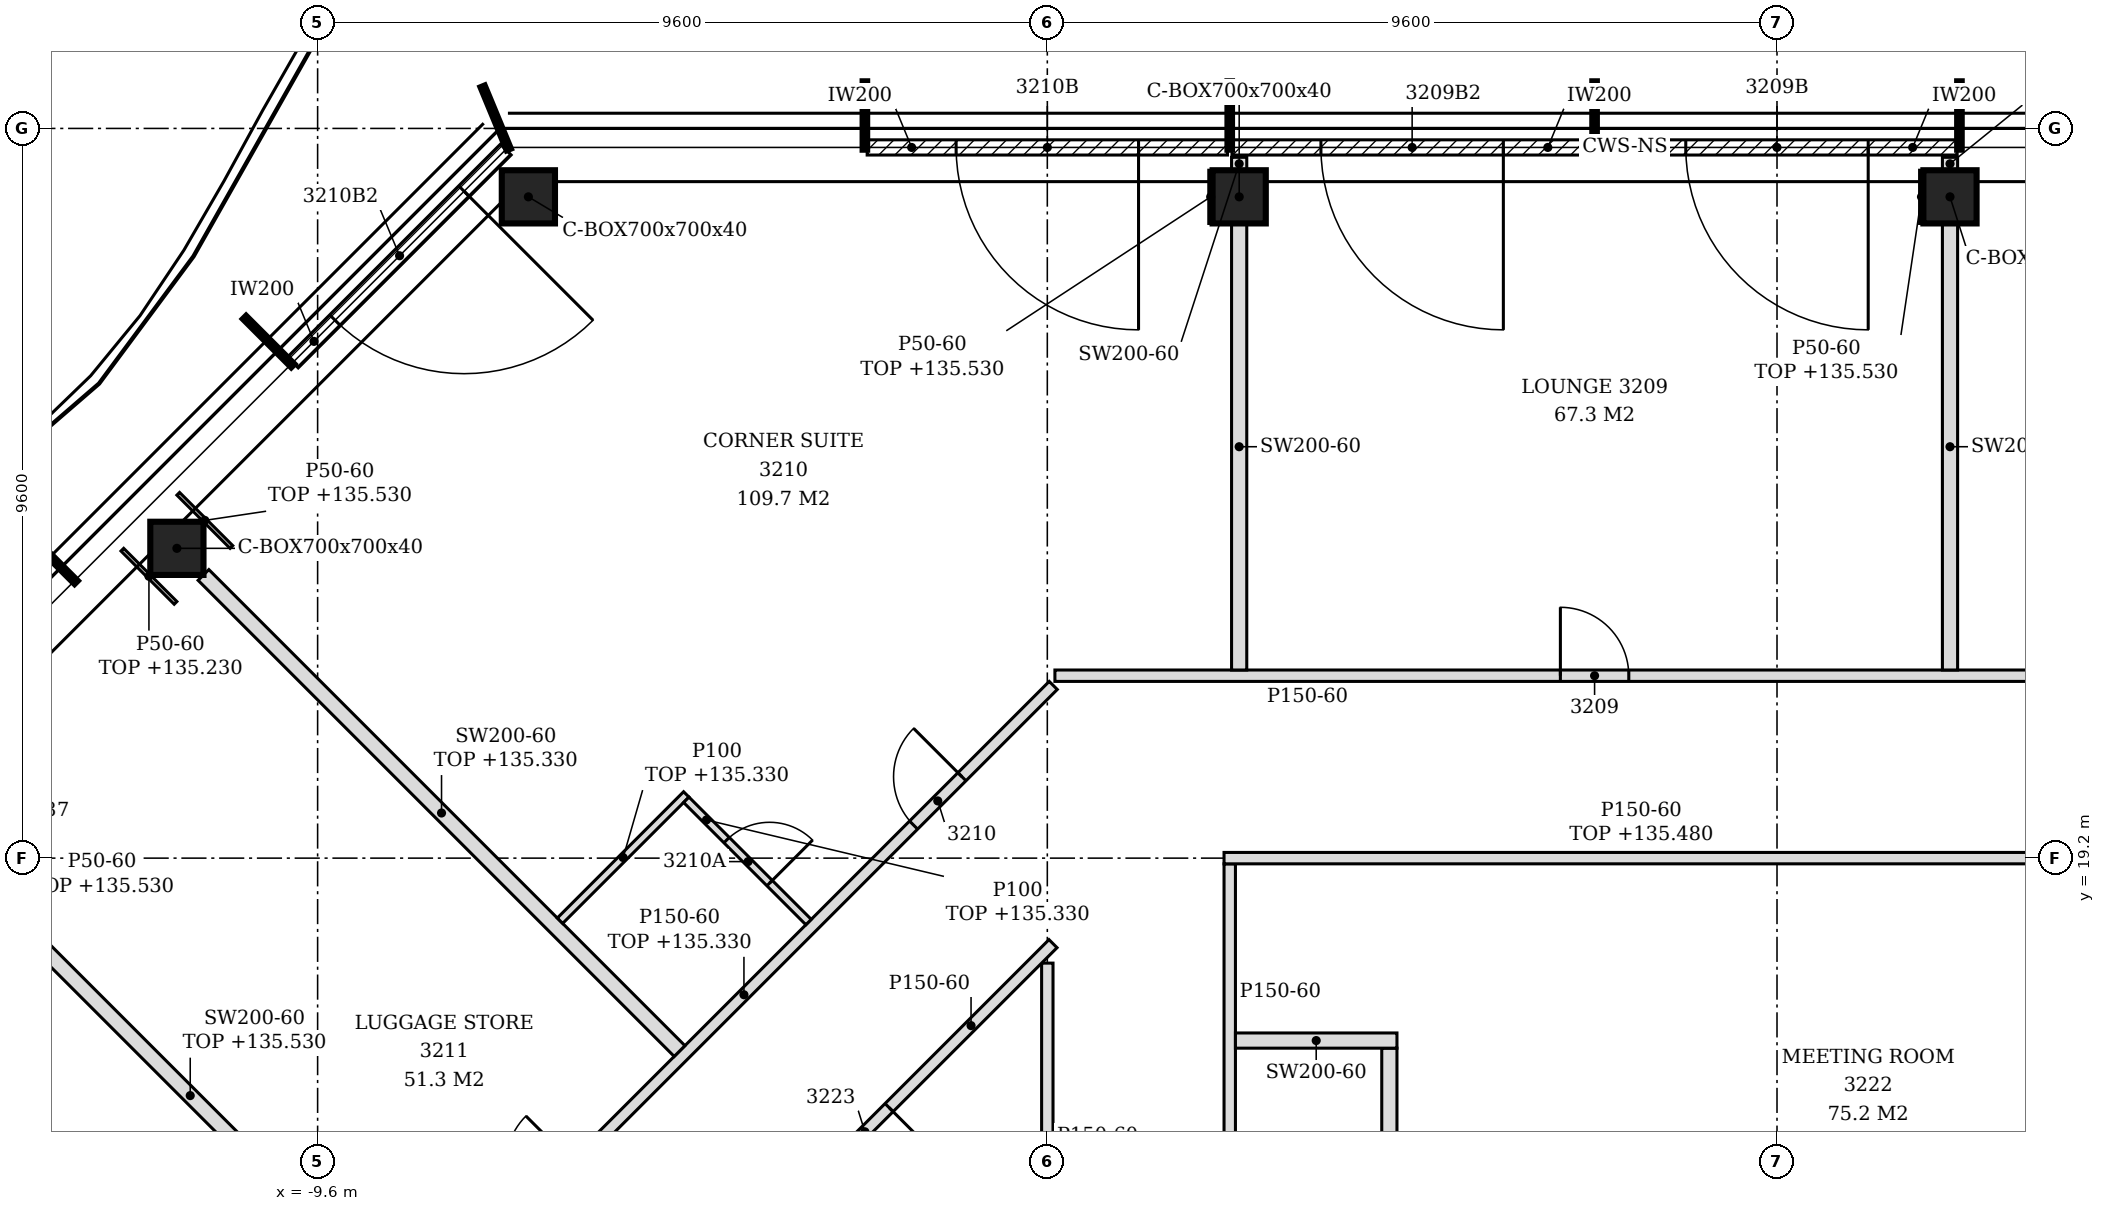
"""IFC4 building model, lengths in metres.
Left out: names, types, materials, properties, quantities, classifications, styles, units other than length and angle.
Written with IfcOpenShell. Run it as: python <this file> out.ifc"""

import sys

from ifc_helpers import new_model, si_unit, direction, frame, frame_2d, origin, origin_2d, place, context, subcontext, project, spatial, polyline, rectangle, hollow_rectangle, outline, extrude, element, fill, save


model = new_model("IFC4")
c1 = context("Model", 3, precision=1e-05, world=origin(), true_north=direction((0.0, 1.0)))
c2 = subcontext(c1, "Body", "Model", "MODEL_VIEW")
j1 = project(units=[si_unit("LENGTHUNIT", "METRE"), si_unit("PLANEANGLEUNIT", "RADIAN")], contexts=[c1])
p1 = place(None, origin())
s1 = spatial("IfcSite", under=j1, at=p1, CompositionType="ELEMENT")
p2 = place(p1, origin())
s2 = spatial("IfcBuilding", under=s1, at=p2, CompositionType="ELEMENT")
p3 = place(p2, frame((0.0, 0.0, 132.6)))
s3 = spatial("IfcBuildingStorey", under=s2, at=p3, CompositionType="ELEMENT", Elevation=132.6)
for number, where, z_axis, x_axis in (
    (1, (11.876, 27.9, -0.15), (0.0, 0.0, 1.0), (1.0, 0.0, 0.0)),
    (2, (2.524, 27.9, -0.15), (0.0, 0.0, 1.0), (1.0, 0.0, 0.0)),
    (3, (-6.827, 27.9, -0.15), (0.0, 0.0, 1.0), (1.0, 0.0, 0.0)),
    (4, (-11.451, 23.276, -0.15), (0.0, 0.0, 1.0), (1.0, 0.0, 0.0)),
):
    element("IfcColumn", number, at=place(p3, frame(where, z_axis=z_axis, x_axis=x_axis)), inside=s3, PredefinedType="COLUMN", context=c2, shape_type="SweptSolid", body=[
        extrude(hollow_rectangle(XDim=0.7, YDim=0.7, WallThickness=0.04, at=origin_2d()), origin(), (0.0, 0.0, 1.0), 3.6),
    ])
p4 = place(p3, frame((11.97, 28.55, 0.0), z_axis=(0.0, 0.0, 1.0), x_axis=(-1.0, 0.0, 0.0)))
e5 = element("IfcWall", 5, at=p4, inside=s3, PredefinedType="NOTDEFINED", context=c2, shape_type="SweptSolid", body=[
    extrude(rectangle(XDim=4.74, YDim=0.2, at=frame_2d((2.37, 0.0))), origin(), (0.0, 0.0, 1.0), 3.45),
])
p5 = place(p4, frame((1.17, 0.0, 0.0)))
e6 = element("IfcOpeningElement", 6, at=p5, cuts=e5, PredefinedType="OPENING", context=c2, shape_type="SweptSolid", body=[
    extrude(rectangle(XDim=2.4, YDim=2.4, at=frame_2d((1.2, 1.2))), frame((0.0, 0.11, 0.0), z_axis=(0.0, -1.0, 0.0), x_axis=(1.0, 0.0, 0.0)), (0.0, 0.0, 1.0), 0.22),
])
p6 = place(p3, frame((7.17, 28.55, 0.0), z_axis=(0.0, 0.0, 1.0), x_axis=(-1.0, 0.0, 0.0)))
e7 = element("IfcWall", 7, at=p6, inside=s3, PredefinedType="NOTDEFINED", context=c2, shape_type="SweptSolid", body=[
    extrude(rectangle(XDim=4.74, YDim=0.2, at=frame_2d((2.37, 0.0))), origin(), (0.0, 0.0, 1.0), 3.45),
])
p7 = place(p6, frame((1.17, 0.0, 0.0)))
e8 = element("IfcOpeningElement", 8, at=p7, cuts=e7, PredefinedType="OPENING", context=c2, shape_type="SweptSolid", body=[
    extrude(rectangle(XDim=2.4, YDim=2.4, at=frame_2d((1.2, 1.2))), frame((0.0, 0.11, 0.0), z_axis=(0.0, -1.0, 0.0), x_axis=(1.0, 0.0, 0.0)), (0.0, 0.0, 1.0), 0.22),
])
p8 = place(p3, frame((2.37, 28.55, 0.0), z_axis=(0.0, 0.0, 1.0), x_axis=(-1.0, 0.0, 0.0)))
e9 = element("IfcWall", 9, at=p8, inside=s3, PredefinedType="NOTDEFINED", context=c2, shape_type="SweptSolid", body=[
    extrude(rectangle(XDim=4.74, YDim=0.2, at=frame_2d((2.37, 0.0))), origin(), (0.0, 0.0, 1.0), 3.45),
])
p9 = place(p8, frame((1.17, 0.0, 0.0)))
e10 = element("IfcOpeningElement", 10, at=p9, cuts=e9, PredefinedType="OPENING", context=c2, shape_type="SweptSolid", body=[
    extrude(rectangle(XDim=2.4, YDim=2.4, at=frame_2d((1.2, 1.2))), frame((0.0, 0.11, 0.0), z_axis=(0.0, -1.0, 0.0), x_axis=(1.0, 0.0, 0.0)), (0.0, 0.0, 1.0), 0.22),
])
p10 = place(p3, frame((-7.125, 28.522, 0.0), z_axis=(0.0, 0.0, 1.0), x_axis=(-0.707106781187, -0.707106781187, 0.0)))
e11 = element("IfcWall", 11, at=p10, inside=s3, PredefinedType="NOTDEFINED", context=c2, shape_type="SweptSolid", body=[
    extrude(rectangle(XDim=3.962, YDim=0.2, at=frame_2d((1.981, 0.0))), origin(), (0.0, 0.0, 1.0), 3.45),
])
p11 = place(p10, frame((0.775, 0.0, 0.0)))
e12 = element("IfcOpeningElement", 12, at=p11, cuts=e11, PredefinedType="OPENING", context=c2, shape_type="SweptSolid", body=[
    extrude(rectangle(XDim=2.4, YDim=2.4, at=frame_2d((1.2, 1.2))), frame((0.0, 0.11, 0.0), z_axis=(0.0, -1.0, 0.0), x_axis=(1.0, 0.0, 0.0)), (0.0, 0.0, 1.0), 0.22),
])
p12 = place(p3, frame((-14.475, 6.919, 0.0), z_axis=(0.0, 0.0, 1.0), x_axis=(0.707106781187, 0.707106781187, 0.0)))
e13 = element("IfcWall", 13, at=p12, inside=s3, PredefinedType="PARTITIONING", context=c2, shape_type="SweptSolid", body=[
    extrude(rectangle(XDim=20.581, YDim=0.15, at=frame_2d((10.291, 0.0))), origin(), (0.0, 0.0, 1.0), 2.73),
])
p13 = place(p12, frame((17.983, 0.0, 0.0)))
e14 = element("IfcOpeningElement", 14, at=p13, cuts=e13, PredefinedType="OPENING", context=c2, shape_type="SweptSolid", body=[
    extrude(rectangle(XDim=0.9, YDim=2.1, at=frame_2d((0.45, 1.05))), frame((0.0, 0.085, 0.0), z_axis=(0.0, -1.0, 0.0), x_axis=(1.0, 0.0, 0.0)), (0.0, 0.0, 1.0), 0.17),
])
p14 = place(p12, frame((10.77, 0.0, 0.0)))
e15 = element("IfcOpeningElement", 15, at=p14, cuts=e13, PredefinedType="OPENING", context=c2, shape_type="SweptSolid", body=[
    extrude(rectangle(XDim=0.9, YDim=2.1, at=frame_2d((0.45, 1.05))), frame((0.0, 0.085, 0.0), z_axis=(0.0, -1.0, 0.0), x_axis=(1.0, 0.0, 0.0)), (0.0, 0.0, 1.0), 0.17),
])
p15 = place(p12, frame((7.014, 0.0, 0.0)))
e16 = element("IfcOpeningElement", 16, at=p15, cuts=e13, PredefinedType="OPENING", context=c2, shape_type="SweptSolid", body=[
    extrude(rectangle(XDim=0.9, YDim=2.1, at=frame_2d((0.45, 1.05))), frame((0.0, 0.085, 0.0), z_axis=(0.0, -1.0, 0.0), x_axis=(1.0, 0.0, 0.0)), (0.0, 0.0, 1.0), 0.17),
])
p16 = place(p12, frame((1.499, 0.0, 0.0)))
e17 = element("IfcOpeningElement", 17, at=p16, cuts=e13, PredefinedType="OPENING", context=c2, shape_type="SweptSolid", body=[
    extrude(rectangle(XDim=0.9, YDim=2.1, at=frame_2d((0.45, 1.05))), frame((0.0, 0.085, 0.0), z_axis=(0.0, -1.0, 0.0), x_axis=(1.0, 0.0, 0.0)), (0.0, 0.0, 1.0), 0.17),
])
p17 = place(p3, frame((-8.35, 13.15, 0.0), z_axis=(0.0, 0.0, 1.0), x_axis=(-0.707092030896, 0.707121531169, 0.0)))
e18 = element("IfcWall", 18, at=p17, inside=s3, PredefinedType="PARTITIONING", context=c2, shape_type="SweptSolid", body=[
    extrude(rectangle(XDim=8.276, YDim=0.2, at=frame_2d((4.138, 0.0))), origin(), (0.0, 0.0, 1.0), 2.93),
])
p18 = place(p3, frame((0.0, 13.275, 0.0), z_axis=(0.0, 0.0, 1.0), x_axis=(0.0, 1.0, 0.0)))
e19 = element("IfcWall", 19, at=p18, inside=s3, PredefinedType="PARTITIONING", context=c2, shape_type="SweptSolid", body=[
    extrude(outline(polyline([(0.0, 0.0), (4.544, 0.0), (4.544, 3.45), (0.075, 3.45), (0.073, 2.83), (0.0, 2.83), (0.0, 0.0)])), frame((0.0, 0.075, 0.0), z_axis=(0.0, -1.0, 0.0), x_axis=(1.0, 0.0, 0.0)), (0.0, 0.0, 1.0), 0.15),
])
p19 = place(p3, frame((2.4, 13.275, 0.0), z_axis=(0.0, 0.0, 1.0), x_axis=(0.0, 1.0, 0.0)))
e20 = element("IfcWall", 20, at=p19, inside=s3, PredefinedType="PARTITIONING", context=c2, shape_type="SweptSolid", body=[
    extrude(outline(polyline([(0.0, 0.0), (5.85, 0.0), (5.85, 2.88), (5.82, 2.88), (5.818, 3.45), (0.075, 3.45), (0.073, 2.83), (0.0, 2.83), (0.0, 0.0)])), frame((0.0, 0.075, 0.0), z_axis=(0.0, -1.0, 0.0), x_axis=(1.0, 0.0, 0.0)), (0.0, 0.0, 1.0), 0.15),
])
p20 = place(p19, frame((1.325, 0.0, 0.0)))
e21 = element("IfcOpeningElement", 21, at=p20, cuts=e20, PredefinedType="OPENING", context=c2, shape_type="SweptSolid", body=[
    extrude(rectangle(XDim=0.8, YDim=2.1, at=frame_2d((0.4, 1.05))), frame((0.0, 0.085, 0.0), z_axis=(0.0, -1.0, 0.0), x_axis=(1.0, 0.0, 0.0)), (0.0, 0.0, 1.0), 0.17),
])
p21 = place(p3, frame((4.5, 13.275, 0.0), z_axis=(0.0, 0.0, 1.0), x_axis=(0.0, 1.0, 0.0)))
e22 = element("IfcWall", 22, at=p21, inside=s3, PredefinedType="PARTITIONING", context=c2, shape_type="SweptSolid", body=[
    extrude(outline(polyline([(0.0, 0.0), (3.425, 0.0), (3.425, 3.45), (0.075, 3.45), (0.073, 2.83), (0.0, 2.83), (0.0, 0.0)])), frame((0.0, 0.1, 0.0), z_axis=(0.0, -1.0, 0.0), x_axis=(1.0, 0.0, 0.0)), (0.0, 0.0, 1.0), 0.2),
])
p22 = place(p3, frame((-4.592, 13.408, 0.0), z_axis=(0.0, 0.0, 1.0), x_axis=(0.707106781187, 0.707106781187, 0.0)))
e23 = element("IfcWall", 23, at=p22, inside=s3, PredefinedType="PARTITIONING", context=c2, shape_type="SweptSolid", body=[
    extrude(rectangle(XDim=6.599, YDim=0.15, at=frame_2d((3.3, 0.0))), origin(), (0.0, 0.0, 1.0), 3.45),
])
p23 = place(p22, frame((2.649, 0.0, 0.0)))
e24 = element("IfcOpeningElement", 24, at=p23, cuts=e23, PredefinedType="OPENING", context=c2, shape_type="SweptSolid", body=[
    extrude(rectangle(XDim=0.9, YDim=2.1, at=frame_2d((0.45, 1.05))), frame((0.0, 0.085, 0.0), z_axis=(0.0, -1.0, 0.0), x_axis=(1.0, 0.0, 0.0)), (0.0, 0.0, 1.0), 0.17),
])
p24 = place(p3, frame((-4.838, 16.662, 0.0), z_axis=(0.0, 0.0, 1.0), x_axis=(-0.707120561855, 0.707093000249, 0.0)))
e25 = element("IfcWall", 25, at=p24, inside=s3, PredefinedType="PARTITIONING", context=c2, shape_type="SweptSolid", body=[
    extrude(rectangle(XDim=8.858, YDim=0.2, at=frame_2d((4.429, 0.0))), origin(), (0.0, 0.0, 1.0), 2.73),
])
p25 = place(p3, frame((2.475, 16.8, 0.0), z_axis=(0.0, 0.0, 1.0), x_axis=(1.0, 0.0, 0.0)))
e26 = element("IfcWall", 26, at=p25, inside=s3, PredefinedType="PARTITIONING", context=c2, shape_type="SweptSolid", body=[
    extrude(rectangle(XDim=2.125, YDim=0.2, at=frame_2d((1.062, 0.0))), origin(), (0.0, 0.0, 1.0), 3.45),
])
p26 = place(p3, frame((-6.411, 18.377, 0.0), z_axis=(0.0, 0.0, 1.0), x_axis=(0.707106781187, 0.707106781187, 0.0)))
e27 = element("IfcWall", 27, at=p26, inside=s3, PredefinedType="PARTITIONING", context=c2, shape_type="SweptSolid", body=[
    extrude(rectangle(XDim=2.35, YDim=0.1, at=frame_2d((1.175, 0.0))), origin(), (0.0, 0.0, 1.0), 2.73),
])
p27 = place(p3, frame((-3.141, 18.359, 0.0), z_axis=(0.0, 0.0, 1.0), x_axis=(-0.707053116953, 0.707160441348, 0.0)))
e28 = element("IfcWall", 28, at=p27, inside=s3, PredefinedType="PARTITIONING", context=c2, shape_type="SweptSolid", body=[
    extrude(rectangle(XDim=2.275, YDim=0.1, at=frame_2d((1.137, 0.0))), origin(), (0.0, 0.0, 1.0), 2.73),
])
p28 = place(p27, frame((0.725, 0.0, 0.0)))
e29 = element("IfcOpeningElement", 29, at=p28, cuts=e28, PredefinedType="OPENING", context=c2, shape_type="SweptSolid", body=[
    extrude(rectangle(XDim=0.8, YDim=2.1, at=frame_2d((0.4, 1.05))), frame((0.0, 0.06, 0.0), z_axis=(0.0, -1.0, 0.0), x_axis=(1.0, 0.0, 0.0)), (0.0, 0.0, 1.0), 0.12),
])
p29 = place(p3, frame((2.325, 19.2, 0.0), z_axis=(0.0, 0.0, 1.0), x_axis=(1.0, 0.0, 0.0)))
e30 = element("IfcWall", 30, at=p29, inside=s3, PredefinedType="PARTITIONING", context=c2, shape_type="SweptSolid", body=[
    extrude(outline(polyline([(0.0, 0.0), (10.981, 0.0), (10.981, 2.88), (5.025, 2.88), (5.023, 2.73), (4.725, 2.73), (4.723, 2.88), (0.0, 2.88), (0.0, 0.0)])), frame((0.0, 0.075, 0.0), z_axis=(0.0, -1.0, 0.0), x_axis=(1.0, 0.0, 0.0)), (0.0, 0.0, 1.0), 0.15),
])
p30 = place(p3, frame((0.1, 21.6, 0.0), z_axis=(0.0, 0.0, 1.0), x_axis=(1.0, 0.0, 0.0)))
e31 = element("IfcWall", 31, at=p30, inside=s3, PredefinedType="PARTITIONING", context=c2, shape_type="SweptSolid", body=[
    extrude(outline(polyline([(0.0, 0.0), (14.2, 0.0), (14.2, 3.45), (7.25, 3.45), (7.248, 2.73), (6.95, 2.73), (6.948, 3.45), (0.0, 3.45), (0.0, 0.0)])), frame((0.0, 0.075, 0.0), z_axis=(0.0, -1.0, 0.0), x_axis=(1.0, 0.0, 0.0)), (0.0, 0.0, 1.0), 0.15),
])
p31 = place(p30, frame((6.65, 0.0, 0.0)))
e32 = element("IfcOpeningElement", 32, at=p31, cuts=e31, PredefinedType="OPENING", context=c2, shape_type="SweptSolid", body=[
    extrude(rectangle(XDim=0.9, YDim=2.1, at=frame_2d((0.45, 1.05))), frame((0.0, 0.085, 0.0), z_axis=(0.0, -1.0, 0.0), x_axis=(1.0, 0.0, 0.0)), (0.0, 0.0, 1.0), 0.17),
])
for number, where, z_axis, x_axis in (
    (33, (2.524, 21.675, 0.0), (0.0, 0.0, 1.0), (0.0, 1.0, 0.0)),
    (34, (11.876, 21.675, 0.0), (0.0, 0.0, 1.0), (0.0, 1.0, 0.0)),
):
    element("IfcWall", number, at=place(p3, frame(where, z_axis=z_axis, x_axis=x_axis)), inside=s3, PredefinedType="PARTITIONING", context=c2, shape_type="SweptSolid", body=[
        extrude(outline(polyline([(0.0, 0.0), (5.875, 0.0), (5.875, 3.45), (2.43, 3.45), (2.428, 2.88), (2.22, 2.88), (2.218, 3.45), (0.0, 3.45), (0.0, 0.0)])), frame((0.0, 0.1, 0.0), z_axis=(0.0, -1.0, 0.0), x_axis=(1.0, 0.0, 0.0)), (0.0, 0.0, 1.0), 0.2),
    ])
for number, where, z_axis, x_axis in (
    (35, (2.524, 28.25, 0.0), (0.0, 0.0, 1.0), (0.0, 1.0, 0.0)),
    (36, (11.876, 28.25, 0.0), (0.0, 0.0, 1.0), (0.0, 1.0, 0.0)),
):
    element("IfcWall", number, at=place(p3, frame(where, z_axis=z_axis, x_axis=x_axis)), inside=s3, PredefinedType="PARTITIONING", context=c2, shape_type="SweptSolid", body=[
        extrude(rectangle(XDim=0.17, YDim=0.2, at=frame_2d((0.085, 0.0))), origin(), (0.0, 0.0, 1.0), 3.45),
    ])
p32 = place(p3, frame((-11.469, 22.558, 0.0), z_axis=(0.0, 0.0, 1.0), x_axis=(-0.707106781187, 0.707106781187, 0.0)))
e37 = element("IfcWall", 37, at=p32, inside=s3, PredefinedType="PARTITIONING", context=c2, shape_type="SweptSolid", body=[
    extrude(rectangle(XDim=0.99, YDim=0.05, at=frame_2d((0.495, 0.0))), origin(), (0.0, 0.0, 1.0), 2.63),
])
p33 = place(p3, frame((-10.734, 23.293, 0.0), z_axis=(0.0, 0.0, 1.0), x_axis=(-0.707106781187, 0.707106781187, 0.0)))
e38 = element("IfcWall", 38, at=p33, inside=s3, PredefinedType="PARTITIONING", context=c2, shape_type="SweptSolid", body=[
    extrude(rectangle(XDim=0.99, YDim=0.05, at=frame_2d((0.495, 0.0))), origin(), (0.0, 0.0, 1.0), 2.93),
])
for number, where, z_axis, x_axis in (
    (39, (2.149, 27.55, 0.0), (0.0, 0.0, 1.0), (0.0, 1.0, 0.0)),
    (40, (11.501, 27.55, 0.0), (0.0, 0.0, 1.0), (0.0, 1.0, 0.0)),
):
    element("IfcWall", number, at=place(p3, frame(where, z_axis=z_axis, x_axis=x_axis)), inside=s3, PredefinedType="PARTITIONING", context=c2, shape_type="SweptSolid", body=[
        extrude(rectangle(XDim=0.7, YDim=0.05, at=frame_2d((0.35, 0.0))), origin(), (0.0, 0.0, 1.0), 2.93),
    ])
p34 = place(p5, origin())
e41 = element("IfcDoor", 41, at=p34, inside=s3, OperationType="SINGLE_SWING_LEFT", PredefinedType="DOOR", context=c2, shape_type="SweptSolid", body=[
    extrude(rectangle(XDim=2.4, YDim=2.4, at=frame_2d((1.2, 1.2))), frame((0.0, 0.025, 0.0), z_axis=(0.0, -1.0, 0.0), x_axis=(1.0, 0.0, 0.0)), (0.0, 0.0, 1.0), 0.05),
])
fill(e6, e41)
p35 = place(p7, origin())
e42 = element("IfcDoor", 42, at=p35, inside=s3, OperationType="SINGLE_SWING_LEFT", PredefinedType="DOOR", context=c2, shape_type="SweptSolid", body=[
    extrude(rectangle(XDim=2.4, YDim=2.4, at=frame_2d((1.2, 1.2))), frame((0.0, 0.025, 0.0), z_axis=(0.0, -1.0, 0.0), x_axis=(1.0, 0.0, 0.0)), (0.0, 0.0, 1.0), 0.05),
])
fill(e8, e42)
p36 = place(p9, origin())
e43 = element("IfcDoor", 43, at=p36, inside=s3, OperationType="SINGLE_SWING_LEFT", PredefinedType="DOOR", context=c2, shape_type="SweptSolid", body=[
    extrude(rectangle(XDim=2.4, YDim=2.4, at=frame_2d((1.2, 1.2))), frame((0.0, 0.025, 0.0), z_axis=(0.0, -1.0, 0.0), x_axis=(1.0, 0.0, 0.0)), (0.0, 0.0, 1.0), 0.05),
])
fill(e10, e43)
p37 = place(p11, origin())
e44 = element("IfcDoor", 44, at=p37, inside=s3, OperationType="SINGLE_SWING_LEFT", PredefinedType="DOOR", context=c2, shape_type="SweptSolid", body=[
    extrude(rectangle(XDim=2.4, YDim=2.4, at=frame_2d((1.2, 1.2))), frame((0.0, 0.025, 0.0), z_axis=(0.0, -1.0, 0.0), x_axis=(1.0, 0.0, 0.0)), (0.0, 0.0, 1.0), 0.05),
])
fill(e12, e44)
p38 = place(p31, origin())
e45 = element("IfcDoor", 45, at=p38, inside=s3, OperationType="SINGLE_SWING_LEFT", PredefinedType="DOOR", context=c2, shape_type="SweptSolid", body=[
    extrude(rectangle(XDim=0.9, YDim=2.1, at=frame_2d((0.45, 1.05))), frame((0.0, 0.025, 0.0), z_axis=(0.0, -1.0, 0.0), x_axis=(1.0, 0.0, 0.0)), (0.0, 0.0, 1.0), 0.05),
])
fill(e32, e45)
p39 = place(p13, origin())
e46 = element("IfcDoor", 46, at=p39, inside=s3, OperationType="SINGLE_SWING_RIGHT", PredefinedType="DOOR", context=c2, shape_type="SweptSolid", body=[
    extrude(rectangle(XDim=0.9, YDim=2.1, at=frame_2d((0.45, 1.05))), frame((0.0, 0.025, 0.0), z_axis=(0.0, -1.0, 0.0), x_axis=(1.0, 0.0, 0.0)), (0.0, 0.0, 1.0), 0.05),
])
fill(e14, e46)
p40 = place(p28, frame((0.8, 0.0, 0.0), z_axis=(0.0, 0.0, 1.0), x_axis=(-1.0, 0.0, 0.0)))
e47 = element("IfcDoor", 47, at=p40, inside=s3, OperationType="SINGLE_SWING_RIGHT", PredefinedType="DOOR", context=c2, shape_type="SweptSolid", body=[
    extrude(rectangle(XDim=0.8, YDim=2.1, at=frame_2d((0.4, 1.05))), frame((0.0, 0.025, 0.0), z_axis=(0.0, -1.0, 0.0), x_axis=(1.0, 0.0, 0.0)), (0.0, 0.0, 1.0), 0.05),
])
fill(e29, e47)
p41 = place(p23, frame((0.9, 0.0, 0.0), z_axis=(0.0, 0.0, 1.0), x_axis=(-1.0, 0.0, 0.0)))
e48 = element("IfcDoor", 48, at=p41, inside=s3, OperationType="SINGLE_SWING_LEFT", PredefinedType="DOOR", context=c2, shape_type="SweptSolid", body=[
    extrude(rectangle(XDim=0.9, YDim=2.1, at=frame_2d((0.45, 1.05))), frame((0.0, 0.025, 0.0), z_axis=(0.0, -1.0, 0.0), x_axis=(1.0, 0.0, 0.0)), (0.0, 0.0, 1.0), 0.05),
])
fill(e24, e48)
save(model, sys.argv[1])
